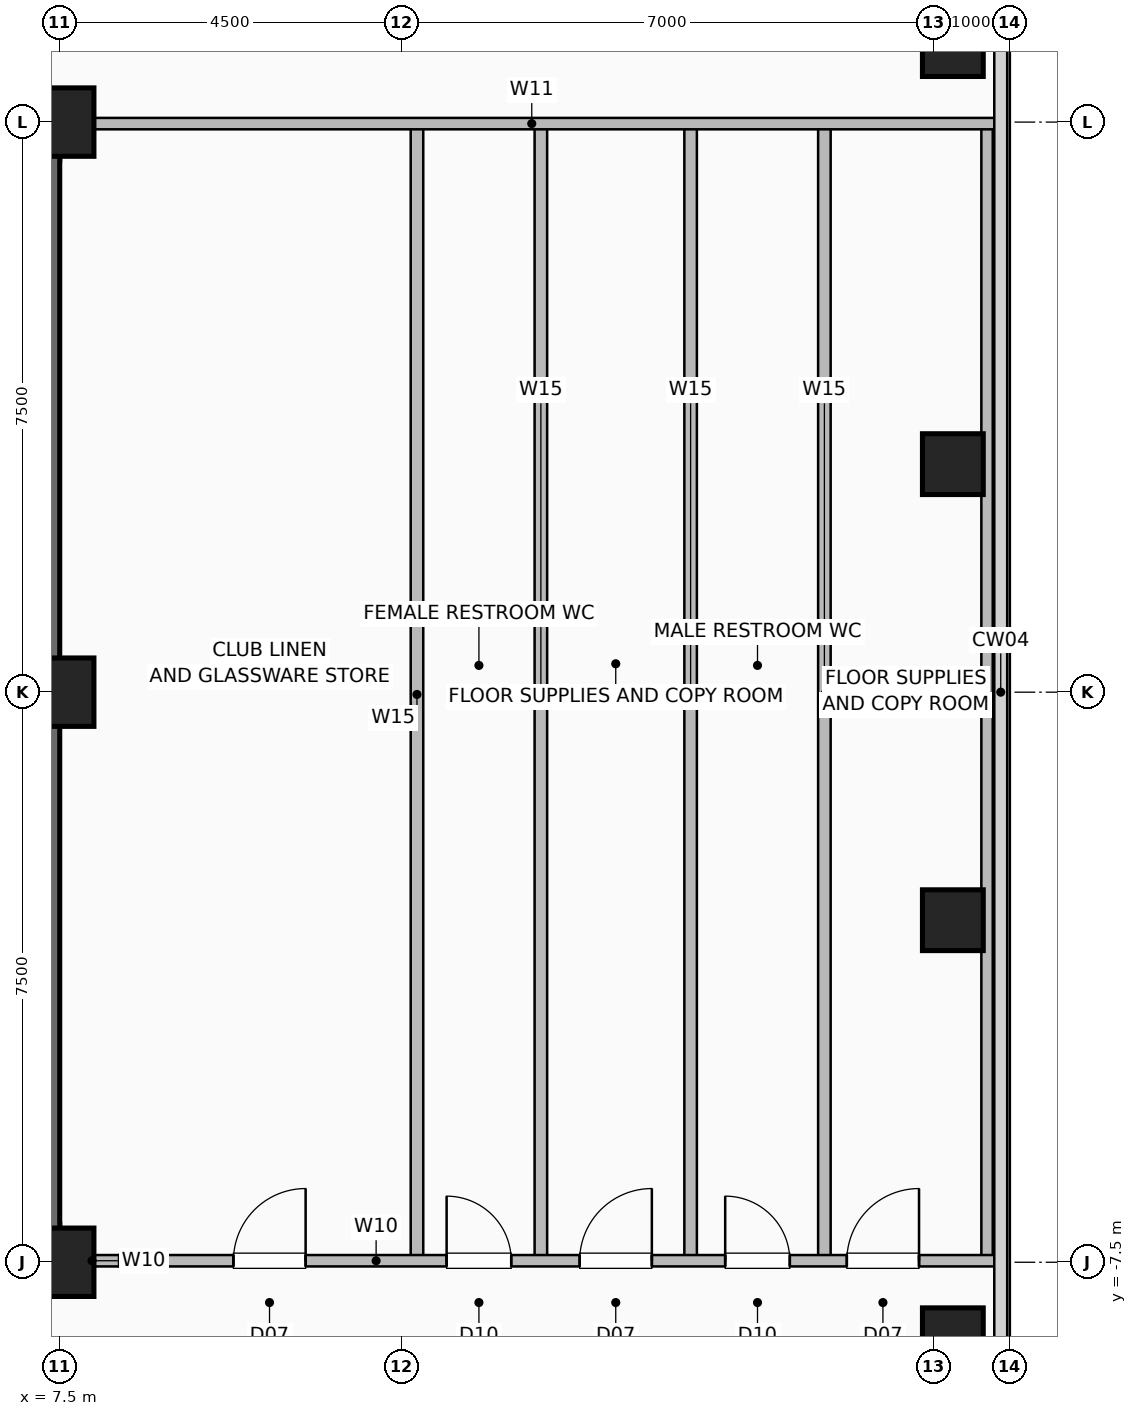
"""IFC4 building model, lengths in metres.
Left out: names, types, materials, properties, quantities, classifications, styles, units other than length and angle.
Written with IfcOpenShell. Run it as: python <this file> out.ifc"""

import sys

from ifc_helpers import new_model, si_unit, direction, frame, frame_2d, origin, origin_2d, place, context, subcontext, project, spatial, rectangle, hollow_rectangle, extrude, element, fill, save


model = new_model("IFC4")
c1 = context("Model", 3, precision=1e-05, world=origin(), true_north=direction((0.0, 1.0)))
c2 = subcontext(c1, "Body", "Model", "MODEL_VIEW")
j1 = project(units=[si_unit("LENGTHUNIT", "METRE"), si_unit("PLANEANGLEUNIT", "RADIAN")], contexts=[c1])
p1 = place(None, origin())
s1 = spatial("IfcSite", under=j1, at=p1, CompositionType="ELEMENT")
p2 = place(p1, origin())
s2 = spatial("IfcBuilding", under=s1, at=p2, CompositionType="ELEMENT")
p3 = place(p2, frame((0.0, 0.0, 198.6)))
s3 = spatial("IfcBuildingStorey", under=s2, at=p3, CompositionType="ELEMENT", Elevation=198.6)
for number, where, z_axis, x_axis in (
    (1, (7.5, -7.5, 0.0), (0.0, 0.0, 1.0), (1.0, 0.0, 0.0)),
    (2, (7.5, 0.0, 0.0), (0.0, 0.0, 1.0), (1.0, 0.0, 0.0)),
    (3, (7.5, 7.5, 0.0), (0.0, 0.0, 1.0), (1.0, 0.0, 0.0)),
):
    element("IfcColumn", number, at=place(p3, frame(where, z_axis=z_axis, x_axis=x_axis)), inside=s3, PredefinedType="COLUMN", context=c2, shape_type="SweptSolid", body=[
        extrude(hollow_rectangle(XDim=0.9, YDim=0.9, WallThickness=0.045, at=origin_2d()), origin(), (0.0, 0.0, 1.0), 3.6),
    ])
for number, where, z_axis, x_axis in (
    (4, (19.25, -8.5, 0.0), (0.0, 0.0, 1.0), (1.0, 0.0, 0.0)),
    (5, (19.25, -3.0, 0.0), (0.0, 0.0, 1.0), (1.0, 0.0, 0.0)),
    (6, (19.25, 3.0, 0.0), (0.0, 0.0, 1.0), (1.0, 0.0, 0.0)),
    (7, (19.25, 8.5, 0.0), (0.0, 0.0, 1.0), (1.0, 0.0, 0.0)),
):
    element("IfcColumn", number, at=place(p3, frame(where, z_axis=z_axis, x_axis=x_axis)), inside=s3, PredefinedType="COLUMN", context=c2, shape_type="SweptSolid", body=[
        extrude(hollow_rectangle(XDim=0.8, YDim=0.8, WallThickness=0.04, at=origin_2d()), origin(), (0.0, 0.0, 1.0), 3.6),
    ])
p4 = place(p3, frame((-7.5, -7.25, 0.0), z_axis=(0.0, 0.0, 1.0), x_axis=(1.0, 0.0, 0.0)))
e8 = element("IfcWall", 8, at=p4, inside=s3, PredefinedType="SHEAR", context=c2, shape_type="SweptSolid", body=[
    extrude(rectangle(XDim=15.0, YDim=0.5, at=frame_2d((7.5, 0.0))), origin(), (0.0, 0.0, 1.0), 3.36),
])
p5 = place(p4, frame((1.55, 0.0, 0.0)))
e9 = element("IfcOpeningElement", 9, at=p5, cuts=e8, PredefinedType="OPENING", context=c2, shape_type="SweptSolid", body=[
    extrude(rectangle(XDim=1.05, YDim=2.08, at=frame_2d((0.525, 1.04))), frame((0.0, 0.26, 0.0), z_axis=(0.0, -1.0, 0.0), x_axis=(1.0, 0.0, 0.0)), (0.0, 0.0, 1.0), 0.52),
])
p6 = place(p4, frame((12.4, 0.0, 0.0)))
e10 = element("IfcOpeningElement", 10, at=p6, cuts=e8, PredefinedType="OPENING", context=c2, shape_type="SweptSolid", body=[
    extrude(rectangle(XDim=1.05, YDim=2.08, at=frame_2d((0.525, 1.04))), frame((0.0, 0.26, 0.0), z_axis=(0.0, -1.0, 0.0), x_axis=(1.0, 0.0, 0.0)), (0.0, 0.0, 1.0), 0.52),
])
p7 = place(p4, frame((5.2, 0.0, 0.0)))
e11 = element("IfcOpeningElement", 11, at=p7, cuts=e8, PredefinedType="OPENING", context=c2, shape_type="SweptSolid", body=[
    extrude(rectangle(XDim=1.0, YDim=2.08, at=frame_2d((0.5, 1.04))), frame((0.0, 0.26, 0.0), z_axis=(0.0, -1.0, 0.0), x_axis=(1.0, 0.0, 0.0)), (0.0, 0.0, 1.0), 0.52),
])
p8 = place(p4, frame((8.65, 0.0, 0.0)))
e12 = element("IfcOpeningElement", 12, at=p8, cuts=e8, PredefinedType="OPENING", context=c2, shape_type="SweptSolid", body=[
    extrude(rectangle(XDim=1.0, YDim=2.08, at=frame_2d((0.5, 1.04))), frame((0.0, 0.26, 0.0), z_axis=(0.0, -1.0, 0.0), x_axis=(1.0, 0.0, 0.0)), (0.0, 0.0, 1.0), 0.52),
])
for number, where, z_axis, x_axis in (
    (13, (-7.5, 7.25, 0.0), (0.0, 0.0, 1.0), (1.0, 0.0, 0.0)),
    (14, (7.25, -7.5, 0.0), (0.0, 0.0, 1.0), (0.0, 1.0, 0.0)),
):
    element("IfcWall", number, at=place(p3, frame(where, z_axis=z_axis, x_axis=x_axis)), inside=s3, PredefinedType="SHEAR", context=c2, shape_type="SweptSolid", body=[
        extrude(rectangle(XDim=15.0, YDim=0.5, at=frame_2d((7.5, 0.0))), origin(), (0.0, 0.0, 1.0), 3.36),
    ])
p9 = place(p3, frame((7.45, -7.48, 0.0), z_axis=(0.0, 0.0, 1.0), x_axis=(1.0, 0.0, 0.0)))
e15 = element("IfcWall", 15, at=p9, inside=s3, PredefinedType="PARTITIONING", context=c2, shape_type="SweptSolid", body=[
    extrude(rectangle(XDim=0.95, YDim=0.15, at=frame_2d((0.475, 0.0))), origin(), (0.0, 0.0, 1.0), 3.36),
])
for number, where, z_axis, x_axis in (
    (16, (13.83, -7.48, 0.0), (0.0, 0.0, 1.0), (0.0, 1.0, 0.0)),
    (17, (17.56, -7.48, 0.0), (0.0, 0.0, 1.0), (0.0, 1.0, 0.0)),
    (18, (12.2, -7.48, 0.0), (0.0, 0.0, 1.0), (0.0, 1.0, 0.0)),
    (19, (15.8, -7.48, 0.0), (0.0, 0.0, 1.0), (0.0, 1.0, 0.0)),
):
    element("IfcWall", number, at=place(p3, frame(where, z_axis=z_axis, x_axis=x_axis)), inside=s3, PredefinedType="PLUMBINGWALL", context=c2, shape_type="SweptSolid", body=[
        extrude(rectangle(XDim=14.9, YDim=0.165, at=frame_2d((7.45, 0.0))), origin(), (0.0, 0.0, 1.0), 3.36),
    ])
p10 = place(p3, frame((19.7, -7.48, 0.0), z_axis=(0.0, 0.0, 1.0), x_axis=(0.0, 1.0, 0.0)))
e20 = element("IfcWall", 20, at=p10, inside=s3, PredefinedType="PARTITIONING", context=c2, shape_type="SweptSolid", body=[
    extrude(rectangle(XDim=14.9, YDim=0.15, at=frame_2d((7.45, 0.0))), origin(), (0.0, 0.0, 1.0), 3.36),
])
p11 = place(p3, frame((8.28, -7.48, 0.0), z_axis=(0.0, 0.0, 1.0), x_axis=(1.0, 0.0, 0.0)))
e21 = element("IfcWall", 21, at=p11, inside=s3, PredefinedType="PARTITIONING", context=c2, shape_type="SweptSolid", body=[
    extrude(rectangle(XDim=11.54, YDim=0.15, at=frame_2d((5.77, 0.0))), origin(), (0.0, 0.0, 1.0), 3.36),
])
p12 = place(p11, frame((1.505, 0.0, 0.0)))
e22 = element("IfcOpeningElement", 22, at=p12, cuts=e21, PredefinedType="OPENING", context=c2, shape_type="SweptSolid", body=[
    extrude(rectangle(XDim=0.95, YDim=2.06, at=frame_2d((0.475, 1.03))), frame((0.0, 0.085, 0.0), z_axis=(0.0, -1.0, 0.0), x_axis=(1.0, 0.0, 0.0)), (0.0, 0.0, 1.0), 0.17),
])
p13 = place(p11, frame((4.31, 0.0, 0.0)))
e23 = element("IfcOpeningElement", 23, at=p13, cuts=e21, PredefinedType="OPENING", context=c2, shape_type="SweptSolid", body=[
    extrude(rectangle(XDim=0.85, YDim=2.05, at=frame_2d((0.425, 1.025))), frame((0.0, 0.085, 0.0), z_axis=(0.0, -1.0, 0.0), x_axis=(1.0, 0.0, 0.0)), (0.0, 0.0, 1.0), 0.17),
])
p14 = place(p11, frame((6.06, 0.0, 0.0)))
e24 = element("IfcOpeningElement", 24, at=p14, cuts=e21, PredefinedType="OPENING", context=c2, shape_type="SweptSolid", body=[
    extrude(rectangle(XDim=0.95, YDim=2.06, at=frame_2d((0.475, 1.03))), frame((0.0, 0.085, 0.0), z_axis=(0.0, -1.0, 0.0), x_axis=(1.0, 0.0, 0.0)), (0.0, 0.0, 1.0), 0.17),
])
p15 = place(p11, frame((7.975, 0.0, 0.0)))
e25 = element("IfcOpeningElement", 25, at=p15, cuts=e21, PredefinedType="OPENING", context=c2, shape_type="SweptSolid", body=[
    extrude(rectangle(XDim=0.85, YDim=2.05, at=frame_2d((0.425, 1.025))), frame((0.0, 0.085, 0.0), z_axis=(0.0, -1.0, 0.0), x_axis=(1.0, 0.0, 0.0)), (0.0, 0.0, 1.0), 0.17),
])
p16 = place(p11, frame((9.575, 0.0, 0.0)))
e26 = element("IfcOpeningElement", 26, at=p16, cuts=e21, PredefinedType="OPENING", context=c2, shape_type="SweptSolid", body=[
    extrude(rectangle(XDim=0.95, YDim=2.06, at=frame_2d((0.475, 1.03))), frame((0.0, 0.085, 0.0), z_axis=(0.0, -1.0, 0.0), x_axis=(1.0, 0.0, 0.0)), (0.0, 0.0, 1.0), 0.17),
])
p17 = place(p3, frame((7.6, 7.48, 0.0), z_axis=(0.0, 0.0, 1.0), x_axis=(1.0, 0.0, 0.0)))
e27 = element("IfcWall", 27, at=p17, inside=s3, PredefinedType="PARTITIONING", context=c2, shape_type="SweptSolid", body=[
    extrude(rectangle(XDim=12.22, YDim=0.15, at=frame_2d((6.11, 0.0))), origin(), (0.0, 0.0, 1.0), 3.36),
])
p18 = place(p12, origin())
e28 = element("IfcDoor", 28, at=p18, inside=s3, OperationType="SINGLE_SWING_RIGHT", PredefinedType="DOOR", context=c2, shape_type="SweptSolid", body=[
    extrude(rectangle(XDim=0.95, YDim=2.06, at=frame_2d((0.475, 1.03))), frame((0.0, 0.025, 0.0), z_axis=(0.0, -1.0, 0.0), x_axis=(1.0, 0.0, 0.0)), (0.0, 0.0, 1.0), 0.05),
])
fill(e22, e28)
p19 = place(p13, origin())
e29 = element("IfcDoor", 29, at=p19, inside=s3, OperationType="SINGLE_SWING_LEFT", PredefinedType="DOOR", context=c2, shape_type="SweptSolid", body=[
    extrude(rectangle(XDim=0.85, YDim=2.05, at=frame_2d((0.425, 1.025))), frame((0.0, 0.025, 0.0), z_axis=(0.0, -1.0, 0.0), x_axis=(1.0, 0.0, 0.0)), (0.0, 0.0, 1.0), 0.05),
])
fill(e23, e29)
p20 = place(p14, origin())
e30 = element("IfcDoor", 30, at=p20, inside=s3, OperationType="SINGLE_SWING_RIGHT", PredefinedType="DOOR", context=c2, shape_type="SweptSolid", body=[
    extrude(rectangle(XDim=0.95, YDim=2.06, at=frame_2d((0.475, 1.03))), frame((0.0, 0.025, 0.0), z_axis=(0.0, -1.0, 0.0), x_axis=(1.0, 0.0, 0.0)), (0.0, 0.0, 1.0), 0.05),
])
fill(e24, e30)
p21 = place(p15, origin())
e31 = element("IfcDoor", 31, at=p21, inside=s3, OperationType="SINGLE_SWING_LEFT", PredefinedType="DOOR", context=c2, shape_type="SweptSolid", body=[
    extrude(rectangle(XDim=0.85, YDim=2.05, at=frame_2d((0.425, 1.025))), frame((0.0, 0.025, 0.0), z_axis=(0.0, -1.0, 0.0), x_axis=(1.0, 0.0, 0.0)), (0.0, 0.0, 1.0), 0.05),
])
fill(e25, e31)
p22 = place(p16, origin())
e32 = element("IfcDoor", 32, at=p22, inside=s3, OperationType="SINGLE_SWING_RIGHT", PredefinedType="DOOR", context=c2, shape_type="SweptSolid", body=[
    extrude(rectangle(XDim=0.95, YDim=2.06, at=frame_2d((0.475, 1.03))), frame((0.0, 0.025, 0.0), z_axis=(0.0, -1.0, 0.0), x_axis=(1.0, 0.0, 0.0)), (0.0, 0.0, 1.0), 0.05),
])
fill(e26, e32)
save(model, sys.argv[1])
